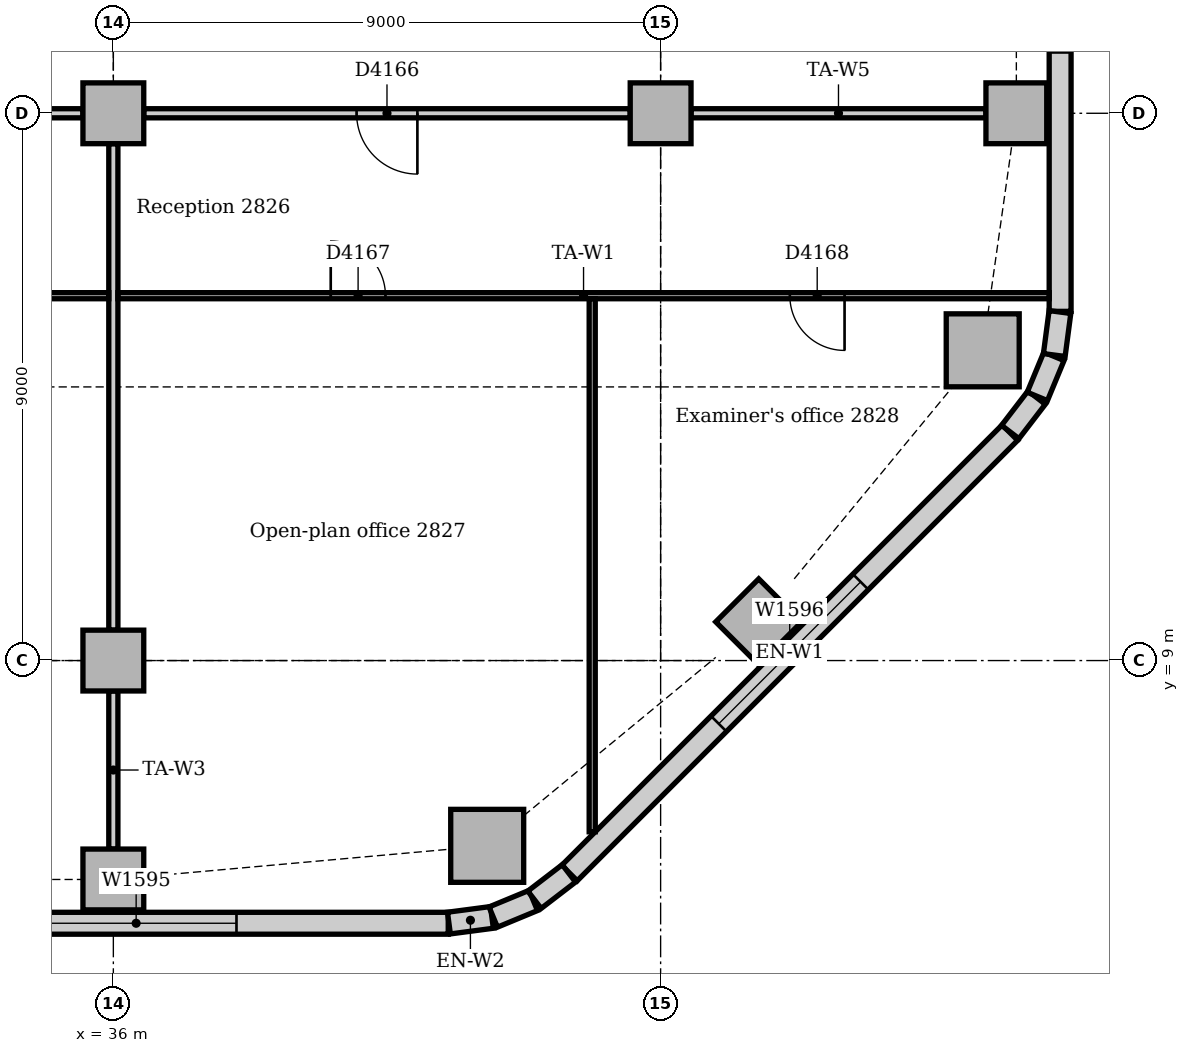
"""IFC4 building model, lengths in metres.
Left out: names, types, materials, properties, quantities, classifications, styles, units other than length and angle.
Written with IfcOpenShell. Run it as: python <this file> out.ifc"""

import sys

from ifc_helpers import new_model, si_unit, direction, frame, frame_2d, origin, origin_2d, place, context, subcontext, project, spatial, rectangle, extrude, element, fill, save


model = new_model("IFC4")
c1 = context("Model", 3, precision=1e-05, world=origin(), true_north=direction((0.0, 1.0)))
c2 = subcontext(c1, "Body", "Model", "MODEL_VIEW")
j1 = project(units=[si_unit("LENGTHUNIT", "METRE"), si_unit("PLANEANGLEUNIT", "RADIAN")], contexts=[c1])
p1 = place(None, origin())
s1 = spatial("IfcSite", under=j1, at=p1, CompositionType="ELEMENT")
p2 = place(p1, origin())
s2 = spatial("IfcBuilding", under=s1, at=p2, CompositionType="ELEMENT")
p3 = place(p2, frame((0.0, 0.0, 120.0)))
s3 = spatial("IfcBuildingStorey", under=s2, at=p3, CompositionType="ELEMENT", Elevation=120.0)
for number, where, z_axis, x_axis in (
    (1, (42.148, 5.953, 0.0), (0.0, 0.0, 1.0), (1.0, 0.0, 0.0)),
    (2, (50.297, 14.102, 0.0), (0.0, 0.0, 1.0), (1.0, 0.0, 0.0)),
):
    element("IfcColumn", number, at=place(p3, frame(where, z_axis=z_axis, x_axis=x_axis)), inside=s3, PredefinedType="COLUMN", context=c2, shape_type="SweptSolid", body=[
        extrude(rectangle(XDim=1.2, YDim=1.2, at=origin_2d()), origin(), (0.0, 0.0, 1.0), 3.85),
    ])
for number, where, z_axis, x_axis in (
    (3, (36.0, 5.4, 0.0), (0.0, 0.0, 1.0), (1.0, 0.0, 0.0)),
    (4, (46.614, 9.636, 0.0), (0.0, 0.0, 1.0), (0.707, 0.707, 0.0)),
    (5, (50.85, 18.0, 0.0), (0.0, 0.0, 1.0), (1.0, 0.0, 0.0)),
    (6, (36.0, 9.0, 0.0), (0.0, 0.0, 1.0), (1.0, 0.0, 0.0)),
    (7, (36.0, 18.0, 0.0), (0.0, 0.0, 1.0), (1.0, 0.0, 0.0)),
    (8, (45.0, 18.0, 0.0), (0.0, 0.0, 1.0), (1.0, 0.0, 0.0)),
):
    element("IfcColumn", number, at=place(p3, frame(where, z_axis=z_axis, x_axis=x_axis)), inside=s3, PredefinedType="COLUMN", context=c2, shape_type="SweptSolid", body=[
        extrude(rectangle(XDim=1.0, YDim=1.0, at=origin_2d()), origin(), (0.0, 0.0, 1.0), 3.85),
    ])
p4 = place(p3, frame((4.243, 4.68, 0.0), z_axis=(0.0, 0.0, 1.0), x_axis=(1.0, 0.0, 0.0)))
e9 = element("IfcWall", 9, at=p4, inside=s3, PredefinedType="STANDARD", context=c2, shape_type="SweptSolid", body=[
    extrude(rectangle(XDim=37.265, YDim=0.36, at=frame_2d((18.632, 0.0))), origin(), (0.0, 0.0, 1.0), 3.85),
])
p5 = place(p4, frame((3.482, 0.0, 0.9)))
e10 = element("IfcOpeningElement", 10, at=p5, cuts=e9, PredefinedType="OPENING", context=c2, shape_type="SweptSolid", body=[
    extrude(rectangle(XDim=3.3, YDim=1.6, at=frame_2d((1.65, 0.8))), frame((0.0, 0.19, 0.0), z_axis=(0.0, -1.0, 0.0), x_axis=(1.0, 0.0, 0.0)), (0.0, 0.0, 1.0), 0.38),
])
p6 = place(p4, frame((9.432, 0.0, 0.9)))
e11 = element("IfcOpeningElement", 11, at=p6, cuts=e9, PredefinedType="OPENING", context=c2, shape_type="SweptSolid", body=[
    extrude(rectangle(XDim=1.8, YDim=1.6, at=frame_2d((0.9, 0.8))), frame((0.0, 0.19, 0.0), z_axis=(0.0, -1.0, 0.0), x_axis=(1.0, 0.0, 0.0)), (0.0, 0.0, 1.0), 0.38),
])
p7 = place(p4, frame((12.482, 0.0, 0.9)))
e12 = element("IfcOpeningElement", 12, at=p7, cuts=e9, PredefinedType="OPENING", context=c2, shape_type="SweptSolid", body=[
    extrude(rectangle(XDim=3.3, YDim=1.6, at=frame_2d((1.65, 0.8))), frame((0.0, 0.19, 0.0), z_axis=(0.0, -1.0, 0.0), x_axis=(1.0, 0.0, 0.0)), (0.0, 0.0, 1.0), 0.38),
])
p8 = place(p4, frame((18.482, 0.0, 0.9)))
e13 = element("IfcOpeningElement", 13, at=p8, cuts=e9, PredefinedType="OPENING", context=c2, shape_type="SweptSolid", body=[
    extrude(rectangle(XDim=1.8, YDim=1.6, at=frame_2d((0.9, 0.8))), frame((0.0, 0.19, 0.0), z_axis=(0.0, -1.0, 0.0), x_axis=(1.0, 0.0, 0.0)), (0.0, 0.0, 1.0), 0.38),
])
p9 = place(p4, frame((21.482, 0.0, 0.9)))
e14 = element("IfcOpeningElement", 14, at=p9, cuts=e9, PredefinedType="OPENING", context=c2, shape_type="SweptSolid", body=[
    extrude(rectangle(XDim=3.3, YDim=1.6, at=frame_2d((1.65, 0.8))), frame((0.0, 0.19, 0.0), z_axis=(0.0, -1.0, 0.0), x_axis=(1.0, 0.0, 0.0)), (0.0, 0.0, 1.0), 0.38),
])
p10 = place(p4, frame((25.982, 0.0, 0.9)))
e15 = element("IfcOpeningElement", 15, at=p10, cuts=e9, PredefinedType="OPENING", context=c2, shape_type="SweptSolid", body=[
    extrude(rectangle(XDim=3.3, YDim=1.6, at=frame_2d((1.65, 0.8))), frame((0.0, 0.19, 0.0), z_axis=(0.0, -1.0, 0.0), x_axis=(1.0, 0.0, 0.0)), (0.0, 0.0, 1.0), 0.38),
])
p11 = place(p4, frame((30.482, 0.0, 0.9)))
e16 = element("IfcOpeningElement", 16, at=p11, cuts=e9, PredefinedType="OPENING", context=c2, shape_type="SweptSolid", body=[
    extrude(rectangle(XDim=3.3, YDim=1.6, at=frame_2d((1.65, 0.8))), frame((0.0, 0.19, 0.0), z_axis=(0.0, -1.0, 0.0), x_axis=(1.0, 0.0, 0.0)), (0.0, 0.0, 1.0), 0.38),
])
p12 = place(p3, frame((43.501, 5.506, 0.0), z_axis=(0.0, 0.0, 1.0), x_axis=(0.707106781187, 0.707106781187, 0.0)))
e17 = element("IfcWall", 17, at=p12, inside=s3, PredefinedType="STANDARD", context=c2, shape_type="SweptSolid", body=[
    extrude(rectangle(XDim=10.243, YDim=0.36, at=frame_2d((5.121, 0.0))), origin(), (0.0, 0.0, 1.0), 3.85),
])
p13 = place(p12, frame((3.471, 0.0, 0.9)))
e18 = element("IfcOpeningElement", 18, at=p13, cuts=e17, PredefinedType="OPENING", context=c2, shape_type="SweptSolid", body=[
    extrude(rectangle(XDim=3.3, YDim=1.6, at=frame_2d((1.65, 0.8))), frame((0.0, 0.19, 0.0), z_axis=(0.0, -1.0, 0.0), x_axis=(1.0, 0.0, 0.0)), (0.0, 0.0, 1.0), 0.38),
])
p14 = place(p3, frame((51.57, 14.743, 0.0), z_axis=(0.0, 0.0, 1.0), x_axis=(0.0, 1.0, 0.0)))
e19 = element("IfcWall", 19, at=p14, inside=s3, PredefinedType="STANDARD", context=c2, shape_type="SweptSolid", body=[
    extrude(rectangle(XDim=24.515, YDim=0.36, at=frame_2d((12.257, 0.0))), origin(), (0.0, 0.0, 1.0), 3.85),
])
p15 = place(p14, frame((4.257, 0.0, 0.9)))
e20 = element("IfcOpeningElement", 20, at=p15, cuts=e19, PredefinedType="OPENING", context=c2, shape_type="SweptSolid", body=[
    extrude(rectangle(XDim=1.8, YDim=1.6, at=frame_2d((0.9, 0.8))), frame((0.0, 0.19, 0.0), z_axis=(0.0, -1.0, 0.0), x_axis=(1.0, 0.0, 0.0)), (0.0, 0.0, 1.0), 0.38),
])
p16 = place(p14, frame((8.057, 0.0, 0.9)))
e21 = element("IfcOpeningElement", 21, at=p16, cuts=e19, PredefinedType="OPENING", context=c2, shape_type="SweptSolid", body=[
    extrude(rectangle(XDim=3.3, YDim=1.6, at=frame_2d((1.65, 0.8))), frame((0.0, 0.19, 0.0), z_axis=(0.0, -1.0, 0.0), x_axis=(1.0, 0.0, 0.0)), (0.0, 0.0, 1.0), 0.38),
])
p17 = place(p14, frame((12.857, 0.0, 0.9)))
e22 = element("IfcOpeningElement", 22, at=p17, cuts=e19, PredefinedType="OPENING", context=c2, shape_type="SweptSolid", body=[
    extrude(rectangle(XDim=3.3, YDim=1.6, at=frame_2d((1.65, 0.8))), frame((0.0, 0.19, 0.0), z_axis=(0.0, -1.0, 0.0), x_axis=(1.0, 0.0, 0.0)), (0.0, 0.0, 1.0), 0.38),
])
p18 = place(p14, frame((17.357, 0.0, 0.9)))
e23 = element("IfcOpeningElement", 23, at=p18, cuts=e19, PredefinedType="OPENING", context=c2, shape_type="SweptSolid", body=[
    extrude(rectangle(XDim=3.3, YDim=1.6, at=frame_2d((1.65, 0.8))), frame((0.0, 0.19, 0.0), z_axis=(0.0, -1.0, 0.0), x_axis=(1.0, 0.0, 0.0)), (0.0, 0.0, 1.0), 0.38),
])
for number, where, z_axis, x_axis in (
    (24, (41.519, 4.683, 0.0), (0.0, 0.0, 1.0), (0.991, 0.131, 0.0)),
    (25, (42.247, 4.782, 0.0), (0.0, 0.0, 1.0), (0.924, 0.383, 0.0)),
):
    element("IfcWall", number, at=place(p3, frame(where, z_axis=z_axis, x_axis=x_axis)), inside=s3, PredefinedType="STANDARD", context=c2, shape_type="SweptSolid", body=[
        extrude(rectangle(XDim=0.713, YDim=0.36, at=frame_2d((0.356, 0.0))), origin(), (0.0, 0.0, 1.0), 3.85),
    ])
for number, where, z_axis, x_axis in (
    (26, (42.925, 5.066, 0.0), (0.0, 0.0, 1.0), (0.793, 0.609, 0.0)),
    (27, (50.75, 12.759, 0.0), (0.0, 0.0, 1.0), (0.609, 0.793, 0.0)),
):
    element("IfcWall", number, at=place(p3, frame(where, z_axis=z_axis, x_axis=x_axis)), inside=s3, PredefinedType="STANDARD", context=c2, shape_type="SweptSolid", body=[
        extrude(rectangle(XDim=0.713, YDim=0.36, at=frame_2d((0.357, 0.0))), origin(), (0.0, 0.0, 1.0), 3.85),
    ])
for number, where, z_axis, x_axis in (
    (28, (51.195, 13.344, 0.0), (0.0, 0.0, 1.0), (0.383, 0.924, 0.0)),
    (29, (51.474, 14.024, 0.0), (0.0, 0.0, 1.0), (0.131, 0.991, 0.0)),
):
    element("IfcWall", number, at=place(p3, frame(where, z_axis=z_axis, x_axis=x_axis)), inside=s3, PredefinedType="STANDARD", context=c2, shape_type="SweptSolid", body=[
        extrude(rectangle(XDim=0.713, YDim=0.36, at=frame_2d((0.356, 0.0))), origin(), (0.0, 0.0, 1.0), 3.85),
    ])
p19 = place(p3, frame((45.5, 18.0, 0.0), z_axis=(0.0, 0.0, 1.0), x_axis=(1.0, 0.0, 0.0)))
e30 = element("IfcWall", 30, at=p19, inside=s3, PredefinedType="PARTITIONING", context=c2, shape_type="SweptSolid", body=[
    extrude(rectangle(XDim=4.85, YDim=0.15, at=frame_2d((2.425, 0.0))), origin(), (0.0, 0.0, 1.0), 3.254),
])
p20 = place(p3, frame((36.5, 18.0, 0.0), z_axis=(0.0, 0.0, 1.0), x_axis=(1.0, 0.0, 0.0)))
e31 = element("IfcWall", 31, at=p20, inside=s3, PredefinedType="PARTITIONING", context=c2, shape_type="SweptSolid", body=[
    extrude(rectangle(XDim=8.0, YDim=0.15, at=frame_2d((4.0, 0.0))), origin(), (0.0, 0.0, 1.0), 3.158),
])
p21 = place(p20, frame((3.5, 0.0, 0.0)))
e32 = element("IfcOpeningElement", 32, at=p21, cuts=e31, PredefinedType="OPENING", context=c2, shape_type="SweptSolid", body=[
    extrude(rectangle(XDim=1.0, YDim=2.1, at=frame_2d((0.5, 1.05))), frame((0.0, 0.085, 0.0), z_axis=(0.0, -1.0, 0.0), x_axis=(1.0, 0.0, 0.0)), (0.0, 0.0, 1.0), 0.17),
])
p22 = place(p3, frame((27.5, 18.0, 0.0), z_axis=(0.0, 0.0, 1.0), x_axis=(1.0, 0.0, 0.0)))
e33 = element("IfcWall", 33, at=p22, inside=s3, PredefinedType="PARTITIONING", context=c2, shape_type="SweptSolid", body=[
    extrude(rectangle(XDim=8.0, YDim=0.15, at=frame_2d((4.0, 0.0))), origin(), (0.0, 0.0, 1.0), 3.158),
])
p23 = place(p22, frame((3.5, 0.0, 0.0)))
e34 = element("IfcOpeningElement", 34, at=p23, cuts=e33, PredefinedType="OPENING", context=c2, shape_type="SweptSolid", body=[
    extrude(rectangle(XDim=1.0, YDim=2.1, at=frame_2d((0.5, 1.05))), frame((0.0, 0.085, 0.0), z_axis=(0.0, -1.0, 0.0), x_axis=(1.0, 0.0, 0.0)), (0.0, 0.0, 1.0), 0.17),
])
p24 = place(p3, frame((36.0, 5.9, 0.0), z_axis=(0.0, 0.0, 1.0), x_axis=(0.0, 1.0, 0.0)))
e35 = element("IfcWall", 35, at=p24, inside=s3, PredefinedType="PARTITIONING", context=c2, shape_type="SweptSolid", body=[
    extrude(rectangle(XDim=2.6, YDim=0.15, at=frame_2d((1.3, 0.0))), origin(), (0.0, 0.0, 1.0), 3.652),
])
p25 = place(p3, frame((36.0, 9.5, 0.0), z_axis=(0.0, 0.0, 1.0), x_axis=(0.0, 1.0, 0.0)))
e36 = element("IfcWall", 36, at=p25, inside=s3, PredefinedType="PARTITIONING", context=c2, shape_type="SweptSolid", body=[
    extrude(rectangle(XDim=8.0, YDim=0.15, at=frame_2d((4.0, 0.0))), origin(), (0.0, 0.0, 1.0), 3.256),
])
p26 = place(p3, frame((36.075, 15.0, 0.0), z_axis=(0.0, 0.0, 1.0), x_axis=(1.0, 0.0, 0.0)))
e37 = element("IfcWall", 37, at=p26, inside=s3, PredefinedType="PARTITIONING", context=c2, shape_type="SweptSolid", body=[
    extrude(rectangle(XDim=15.315, YDim=0.1, at=frame_2d((7.657, 0.0))), origin(), (0.0, 0.0, 1.0), 3.85),
])
p27 = place(p26, frame((3.5, 0.0, 0.0)))
e38 = element("IfcOpeningElement", 38, at=p27, cuts=e37, PredefinedType="OPENING", context=c2, shape_type="SweptSolid", body=[
    extrude(rectangle(XDim=0.9, YDim=2.1, at=frame_2d((0.45, 1.05))), frame((0.0, 0.06, 0.0), z_axis=(0.0, -1.0, 0.0), x_axis=(1.0, 0.0, 0.0)), (0.0, 0.0, 1.0), 0.12),
])
p28 = place(p26, frame((11.05, 0.0, 0.0)))
e39 = element("IfcOpeningElement", 39, at=p28, cuts=e37, PredefinedType="OPENING", context=c2, shape_type="SweptSolid", body=[
    extrude(rectangle(XDim=0.9, YDim=2.1, at=frame_2d((0.45, 1.05))), frame((0.0, 0.06, 0.0), z_axis=(0.0, -1.0, 0.0), x_axis=(1.0, 0.0, 0.0)), (0.0, 0.0, 1.0), 0.12),
])
p29 = place(p3, frame((22.575, 15.0, 0.0), z_axis=(0.0, 0.0, 1.0), x_axis=(1.0, 0.0, 0.0)))
e40 = element("IfcWall", 40, at=p29, inside=s3, PredefinedType="PARTITIONING", context=c2, shape_type="SweptSolid", body=[
    extrude(rectangle(XDim=13.35, YDim=0.1, at=frame_2d((6.675, 0.0))), origin(), (0.0, 0.0, 1.0), 3.85),
])
p30 = place(p29, frame((6.2, 0.0, 0.0)))
e41 = element("IfcOpeningElement", 41, at=p30, cuts=e40, PredefinedType="OPENING", context=c2, shape_type="SweptSolid", body=[
    extrude(rectangle(XDim=0.9, YDim=2.1, at=frame_2d((0.45, 1.05))), frame((0.0, 0.06, 0.0), z_axis=(0.0, -1.0, 0.0), x_axis=(1.0, 0.0, 0.0)), (0.0, 0.0, 1.0), 0.12),
])
p31 = place(p3, frame((43.875, 6.184, 0.0), z_axis=(0.0, 0.0, 1.0), x_axis=(0.0, 1.0, 0.0)))
e42 = element("IfcWall", 42, at=p31, inside=s3, PredefinedType="PARTITIONING", context=c2, shape_type="SweptSolid", body=[
    extrude(rectangle(XDim=8.766, YDim=0.1, at=frame_2d((4.383, 0.0))), origin(), (0.0, 0.0, 1.0), 3.85),
])
p32 = place(p11, origin())
e43 = element("IfcWindow", 43, at=p32, inside=s3, PartitioningType="SINGLE_PANEL", PredefinedType="WINDOW", context=c2, shape_type="SweptSolid", body=[
    extrude(rectangle(XDim=3.3, YDim=1.6, at=frame_2d((1.65, 0.8))), frame((0.0, 0.13, 0.0), z_axis=(0.0, -1.0, 0.0), x_axis=(1.0, 0.0, 0.0)), (0.0, 0.0, 1.0), 0.06),
])
fill(e16, e43)
p33 = place(p13, origin())
e44 = element("IfcWindow", 44, at=p33, inside=s3, PartitioningType="SINGLE_PANEL", PredefinedType="WINDOW", context=c2, shape_type="SweptSolid", body=[
    extrude(rectangle(XDim=3.3, YDim=1.6, at=frame_2d((1.65, 0.8))), frame((0.0, 0.13, 0.0), z_axis=(0.0, -1.0, 0.0), x_axis=(1.0, 0.0, 0.0)), (0.0, 0.0, 1.0), 0.06),
])
fill(e18, e44)
p34 = place(p21, frame((1.0, 0.0, 0.0), z_axis=(0.0, 0.0, 1.0), x_axis=(-1.0, 0.0, 0.0)))
e45 = element("IfcDoor", 45, at=p34, inside=s3, OperationType="SINGLE_SWING_LEFT", PredefinedType="DOOR", context=c2, shape_type="SweptSolid", body=[
    extrude(rectangle(XDim=1.0, YDim=2.1, at=frame_2d((0.5, 1.05))), frame((0.0, 0.025, 0.0), z_axis=(0.0, -1.0, 0.0), x_axis=(1.0, 0.0, 0.0)), (0.0, 0.0, 1.0), 0.05),
])
fill(e32, e45)
p35 = place(p27, origin())
e46 = element("IfcDoor", 46, at=p35, inside=s3, OperationType="SINGLE_SWING_LEFT", PredefinedType="DOOR", context=c2, shape_type="SweptSolid", body=[
    extrude(rectangle(XDim=0.9, YDim=2.1, at=frame_2d((0.45, 1.05))), frame((0.0, 0.025, 0.0), z_axis=(0.0, -1.0, 0.0), x_axis=(1.0, 0.0, 0.0)), (0.0, 0.0, 1.0), 0.05),
])
fill(e38, e46)
p36 = place(p28, frame((0.9, 0.0, 0.0), z_axis=(0.0, 0.0, 1.0), x_axis=(-1.0, 0.0, 0.0)))
e47 = element("IfcDoor", 47, at=p36, inside=s3, OperationType="SINGLE_SWING_LEFT", PredefinedType="DOOR", context=c2, shape_type="SweptSolid", body=[
    extrude(rectangle(XDim=0.9, YDim=2.1, at=frame_2d((0.45, 1.05))), frame((0.0, 0.025, 0.0), z_axis=(0.0, -1.0, 0.0), x_axis=(1.0, 0.0, 0.0)), (0.0, 0.0, 1.0), 0.05),
])
fill(e39, e47)
save(model, sys.argv[1])
